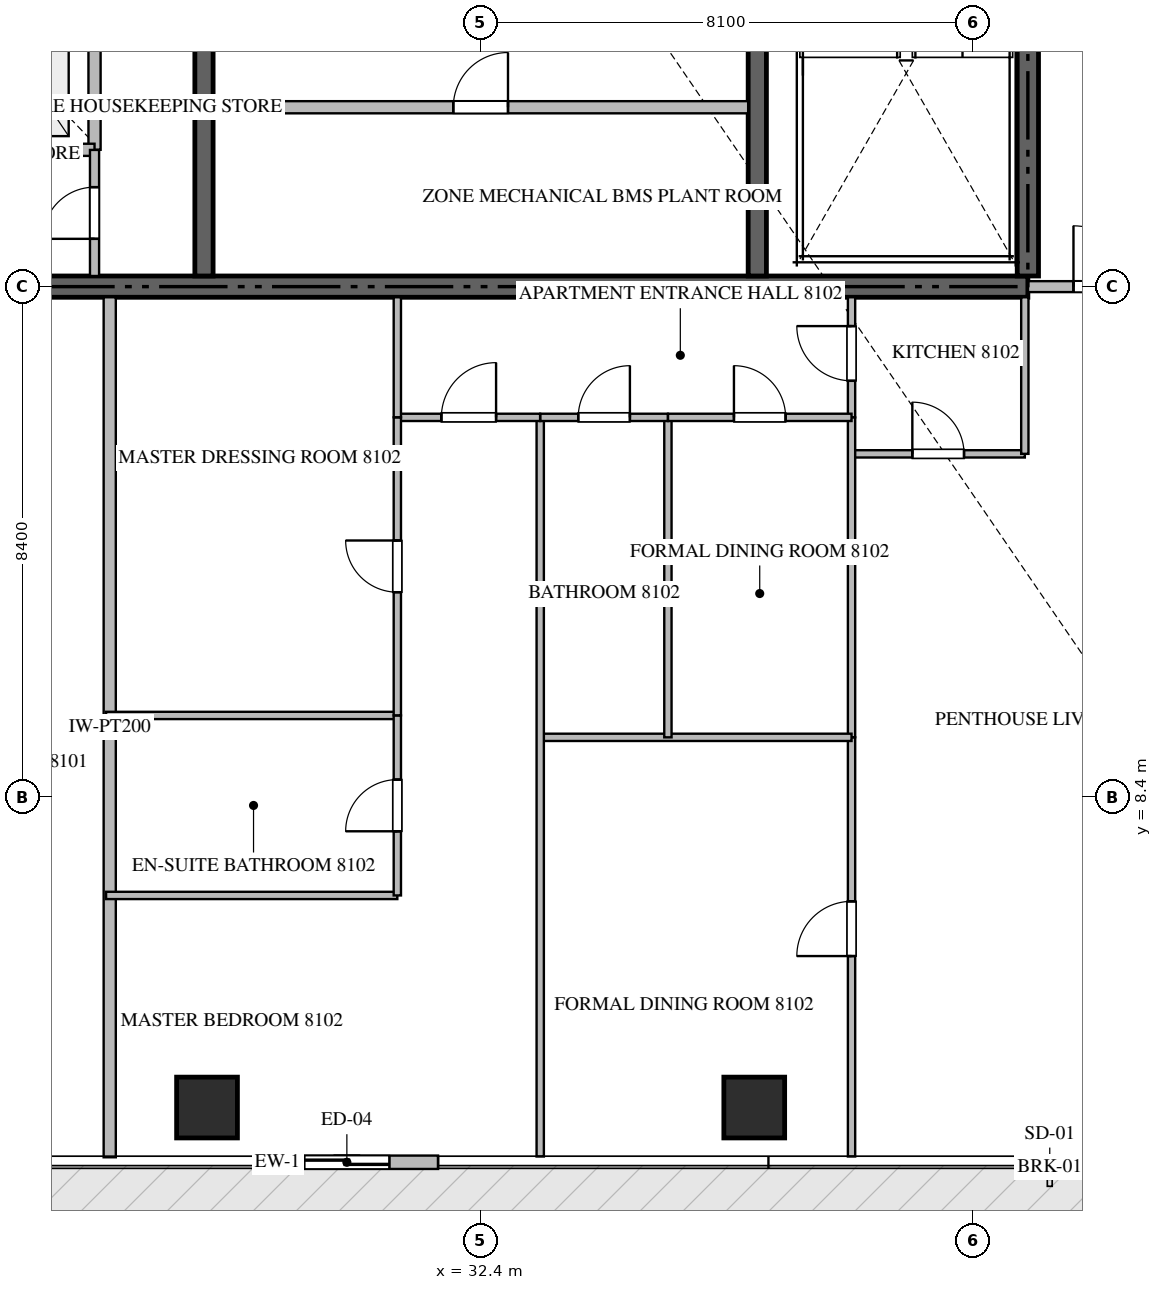
"""IFC4 building model, lengths in metres.
Left out: names, types, materials, properties, quantities, classifications, styles, units other than length and angle.
Written with IfcOpenShell. Run it as: python <this file> out.ifc"""

import sys

from ifc_helpers import new_model, si_unit, direction, frame, frame_2d, origin, origin_2d, place, context, subcontext, project, spatial, rectangle, extrude, source, transform, mapped, element, fill, save


model = new_model("IFC4")
c1 = context("Model", 3, precision=1e-05, world=origin(), true_north=direction((0.0, 1.0)))
c2 = subcontext(c1, "Body", "Model", "MODEL_VIEW")
j1 = project(units=[si_unit("LENGTHUNIT", "METRE"), si_unit("PLANEANGLEUNIT", "RADIAN")], contexts=[c1])
p1 = place(None, origin())
s1 = spatial("IfcSite", under=j1, at=p1, CompositionType="ELEMENT")
p2 = place(p1, origin())
s2 = spatial("IfcBuilding", under=s1, at=p2, CompositionType="ELEMENT")
p3 = place(p2, frame((0.0, 0.0, 325.85)))
s3 = spatial("IfcBuildingStorey", under=s2, at=p3, CompositionType="ELEMENT", Elevation=325.85)
p4 = place(p3, frame((23.4, 16.8, -0.26), z_axis=(0.0, 0.0, 1.0), x_axis=(1.0, 0.0, 0.0)))
e1 = element("IfcWall", 1, at=p4, inside=s3, PredefinedType="SHEAR", context=c2, shape_type="SweptSolid", body=[
    extrude(rectangle(XDim=18.0, YDim=0.35, at=frame_2d((9.0, 0.0))), origin(), (0.0, 0.0, 1.0), 4.048),
])
p5 = place(p3, frame((41.4, 16.975, -0.26), z_axis=(0.0, 0.0, 1.0), x_axis=(0.0, 1.0, 0.0)))
e2 = element("IfcWall", 2, at=p5, inside=s3, PredefinedType="SHEAR", context=c2, shape_type="SweptSolid", body=[
    extrude(rectangle(XDim=8.375, YDim=0.35, at=frame_2d((4.188, 0.0))), origin(), (0.0, 0.0, 1.0), 4.048),
])
p6 = place(p3, frame((27.85, 16.975, -0.26), z_axis=(0.0, 0.0, 1.0), x_axis=(0.0, 1.0, 0.0)))
e3 = element("IfcWall", 3, at=p6, inside=s3, PredefinedType="SHEAR", context=c2, shape_type="SweptSolid", body=[
    extrude(rectangle(XDim=4.875, YDim=0.3, at=frame_2d((2.438, 0.0))), origin(), (0.0, 0.0, 1.0), 4.048),
])
p7 = place(p3, frame((36.95, 16.975, -0.26), z_axis=(0.0, 0.0, 1.0), x_axis=(0.0, 1.0, 0.0)))
e4 = element("IfcWall", 4, at=p7, inside=s3, PredefinedType="SHEAR", context=c2, shape_type="SweptSolid", body=[
    extrude(rectangle(XDim=8.375, YDim=0.3, at=frame_2d((4.188, 0.0))), origin(), (0.0, 0.0, 1.0), 4.048),
])
m1 = source(origin(), c2, "Body", "SweptSolid", [
    extrude(rectangle(XDim=1.0, YDim=1.0, at=origin_2d()), origin(), (0.0, 0.0, 1.0), 4.05),
])
for number, where, z_axis, x_axis in (
    (5, (27.9, 3.3, -0.26), (0.0, 0.0, 1.0), (1.0, 0.0, 0.0)),
    (6, (36.9, 3.3, -0.26), (0.0, 0.0, 1.0), (1.0, 0.0, 0.0)),
):
    element("IfcColumn", number, at=place(p3, frame(where, z_axis=z_axis, x_axis=x_axis)), inside=s3, PredefinedType="COLUMN", context=c2, shape_type="MappedRepresentation", body=[
        mapped(m1, transform((0.0, 0.0, 0.0), scale=1.0)),
    ])
p8 = place(p3, frame((28.7, 2.4, 0.0), z_axis=(0.0, 0.0, 1.0), x_axis=(1.0, 0.0, 0.0)))
e7 = element("IfcWall", 7, at=p8, inside=s3, PredefinedType="ELEMENTEDWALL", context=c2, shape_type="SweptSolid", body=[
    extrude(rectangle(XDim=3.0, YDim=0.22, at=frame_2d((1.5, 0.0))), origin(), (0.0, 0.0, 1.0), 3.775),
])
p9 = place(p8, frame((0.8, 0.0, 0.0)))
e8 = element("IfcOpeningElement", 8, at=p9, cuts=e7, PredefinedType="OPENING", context=c2, shape_type="SweptSolid", body=[
    extrude(rectangle(XDim=1.4, YDim=2.25, at=frame_2d((0.7, 1.125))), frame((0.0, 0.12, 0.0), z_axis=(0.0, -1.0, 0.0), x_axis=(1.0, 0.0, 0.0)), (0.0, 0.0, 1.0), 0.24),
])
p10 = place(p3, frame((26.05, 19.05, 0.0), z_axis=(0.0, 0.0, 1.0), x_axis=(0.0, 1.0, 0.0)))
e9 = element("IfcWall", 9, at=p10, inside=s3, PredefinedType="STANDARD", context=c2, shape_type="SweptSolid", body=[
    extrude(rectangle(XDim=2.5, YDim=0.2, at=frame_2d((1.25, 0.0))), origin(), (0.0, 0.0, 1.0), 3.79),
])
p11 = place(p3, frame((23.575, 19.05, 0.0), z_axis=(0.0, 0.0, 1.0), x_axis=(1.0, 0.0, 0.0)))
e10 = element("IfcWall", 10, at=p11, inside=s3, PredefinedType="STANDARD", context=c2, shape_type="SweptSolid", body=[
    extrude(rectangle(XDim=2.475, YDim=0.2, at=frame_2d((1.238, 0.0))), origin(), (0.0, 0.0, 1.0), 3.79),
])
p12 = place(p3, frame((26.05, 16.975, 0.0), z_axis=(0.0, 0.0, 1.0), x_axis=(0.0, 1.0, 0.0)))
e11 = element("IfcWall", 11, at=p12, inside=s3, PredefinedType="PARTITIONING", context=c2, shape_type="SweptSolid", body=[
    extrude(rectangle(XDim=2.073, YDim=0.15, at=frame_2d((1.037, 0.0))), origin(), (0.0, 0.0, 1.0), 3.79),
])
p13 = place(p12, frame((0.611, 0.0, 0.0)))
e12 = element("IfcOpeningElement", 12, at=p13, cuts=e11, PredefinedType="OPENING", context=c2, shape_type="SweptSolid", body=[
    extrude(rectangle(XDim=0.85, YDim=2.1, at=frame_2d((0.425, 1.05))), frame((0.0, 0.085, 0.0), z_axis=(0.0, -1.0, 0.0), x_axis=(1.0, 0.0, 0.0)), (0.0, 0.0, 1.0), 0.17),
])
p14 = place(p3, frame((28.0, 19.75, 0.0), z_axis=(0.0, 0.0, 1.0), x_axis=(1.0, 0.0, 0.0)))
e13 = element("IfcWall", 13, at=p14, inside=s3, PredefinedType="STANDARD", context=c2, shape_type="SweptSolid", body=[
    extrude(rectangle(XDim=8.8, YDim=0.2, at=frame_2d((4.4, 0.0))), origin(), (0.0, 0.0, 1.0), 3.79),
])
p15 = place(p14, frame((3.95, 0.0, 0.0)))
e14 = element("IfcOpeningElement", 14, at=p15, cuts=e13, PredefinedType="OPENING", context=c2, shape_type="SweptSolid", body=[
    extrude(rectangle(XDim=0.9, YDim=2.1, at=frame_2d((0.45, 1.05))), frame((0.0, 0.11, 0.0), z_axis=(0.0, -1.0, 0.0), x_axis=(1.0, 0.0, 0.0)), (0.0, 0.0, 1.0), 0.22),
])
p16 = place(p3, frame((26.3, 2.482, 0.0), z_axis=(0.0, 0.0, 1.0), x_axis=(0.0, 1.0, 0.0)))
e15 = element("IfcWall", 15, at=p16, inside=s3, PredefinedType="PARTITIONING", context=c2, shape_type="SweptSolid", body=[
    extrude(rectangle(XDim=14.143, YDim=0.2, at=frame_2d((7.072, 0.0))), origin(), (0.0, 0.0, 1.0), 3.79),
])
p17 = place(p3, frame((41.402, 16.8, 0.0), z_axis=(0.0, 0.0, 1.0), x_axis=(1.0, 0.0, 0.0)))
e16 = element("IfcWall", 16, at=p17, inside=s3, PredefinedType="PARTITIONING", context=c2, shape_type="SweptSolid", body=[
    extrude(rectangle(XDim=2.496, YDim=0.18, at=frame_2d((1.248, 0.0))), origin(), (0.0, 0.0, 1.0), 3.79),
])
p18 = place(p17, frame((0.748, 0.0, 0.0)))
e17 = element("IfcOpeningElement", 17, at=p18, cuts=e16, PredefinedType="OPENING", context=c2, shape_type="SweptSolid", body=[
    extrude(rectangle(XDim=1.0, YDim=2.15, at=frame_2d((0.5, 1.075))), frame((0.0, 0.1, 0.0), z_axis=(0.0, -1.0, 0.0), x_axis=(1.0, 0.0, 0.0)), (0.0, 0.0, 1.0), 0.2),
])
p19 = place(p3, frame((38.5, 14.05, 0.0), z_axis=(0.0, 0.0, 1.0), x_axis=(1.0, 0.0, 0.0)))
e18 = element("IfcWall", 18, at=p19, inside=s3, PredefinedType="PARTITIONING", context=c2, shape_type="SweptSolid", body=[
    extrude(rectangle(XDim=2.85, YDim=0.12, at=frame_2d((1.425, 0.0))), origin(), (0.0, 0.0, 1.0), 3.79),
])
p20 = place(p19, frame((1.0, 0.0, 0.0)))
e19 = element("IfcOpeningElement", 19, at=p20, cuts=e18, PredefinedType="OPENING", context=c2, shape_type="SweptSolid", body=[
    extrude(rectangle(XDim=0.85, YDim=2.1, at=frame_2d((0.425, 1.05))), frame((0.0, 0.07, 0.0), z_axis=(0.0, -1.0, 0.0), x_axis=(1.0, 0.0, 0.0)), (0.0, 0.0, 1.0), 0.14),
])
p21 = place(p3, frame((41.35, 14.05, 0.0), z_axis=(0.0, 0.0, 1.0), x_axis=(0.0, 1.0, 0.0)))
e20 = element("IfcWall", 20, at=p21, inside=s3, PredefinedType="PARTITIONING", context=c2, shape_type="SweptSolid", body=[
    extrude(rectangle(XDim=2.575, YDim=0.12, at=frame_2d((1.288, 0.0))), origin(), (0.0, 0.0, 1.0), 3.79),
])
p22 = place(p3, frame((38.5, 14.65, 0.0), z_axis=(0.0, 0.0, 1.0), x_axis=(0.0, 1.0, 0.0)))
e21 = element("IfcWall", 21, at=p22, inside=s3, PredefinedType="PARTITIONING", context=c2, shape_type="SweptSolid", body=[
    extrude(rectangle(XDim=1.975, YDim=0.12, at=frame_2d((0.988, 0.0))), origin(), (0.0, 0.0, 1.0), 3.79),
])
p23 = place(p22, frame((0.601, 0.0, 0.0)))
e22 = element("IfcOpeningElement", 22, at=p23, cuts=e21, PredefinedType="OPENING", context=c2, shape_type="SweptSolid", body=[
    extrude(rectangle(XDim=0.9, YDim=2.1, at=frame_2d((0.45, 1.05))), frame((0.0, 0.07, 0.0), z_axis=(0.0, -1.0, 0.0), x_axis=(1.0, 0.0, 0.0)), (0.0, 0.0, 1.0), 0.14),
])
p24 = place(p3, frame((38.5, 2.495, 0.0), z_axis=(0.0, 0.0, 1.0), x_axis=(0.0, 1.0, 0.0)))
e23 = element("IfcWall", 23, at=p24, inside=s3, PredefinedType="PARTITIONING", context=c2, shape_type="SweptSolid", body=[
    extrude(rectangle(XDim=6.893, YDim=0.12, at=frame_2d((3.446, 0.0))), origin(), (0.0, 0.0, 1.0), 3.79),
])
p25 = place(p24, frame((3.296, 0.0, 0.0)))
e24 = element("IfcOpeningElement", 24, at=p25, cuts=e23, PredefinedType="OPENING", context=c2, shape_type="SweptSolid", body=[
    extrude(rectangle(XDim=0.9, YDim=2.1, at=frame_2d((0.45, 1.05))), frame((0.0, 0.07, 0.0), z_axis=(0.0, -1.0, 0.0), x_axis=(1.0, 0.0, 0.0)), (0.0, 0.0, 1.0), 0.14),
])
p26 = place(p3, frame((38.5, 9.39, 0.0), z_axis=(0.0, 0.0, 1.0), x_axis=(0.0, 1.0, 0.0)))
e25 = element("IfcWall", 25, at=p26, inside=s3, PredefinedType="PARTITIONING", context=c2, shape_type="SweptSolid", body=[
    extrude(rectangle(XDim=5.258, YDim=0.12, at=frame_2d((2.629, 0.0))), origin(), (0.0, 0.0, 1.0), 3.79),
])
p27 = place(p3, frame((33.38, 9.388, 0.0), z_axis=(0.0, 0.0, 1.0), x_axis=(1.0, 0.0, 0.0)))
e26 = element("IfcWall", 26, at=p27, inside=s3, PredefinedType="PARTITIONING", context=c2, shape_type="SweptSolid", body=[
    extrude(rectangle(XDim=5.12, YDim=0.12, at=frame_2d((2.56, 0.0))), origin(), (0.0, 0.0, 1.0), 3.79),
])
p28 = place(p3, frame((33.38, 2.495, 0.0), z_axis=(0.0, 0.0, 1.0), x_axis=(0.0, 1.0, 0.0)))
e27 = element("IfcWall", 27, at=p28, inside=s3, PredefinedType="PARTITIONING", context=c2, shape_type="SweptSolid", body=[
    extrude(rectangle(XDim=12.155, YDim=0.12, at=frame_2d((6.077, 0.0))), origin(), (0.0, 0.0, 1.0), 3.79),
])
p29 = place(p3, frame((35.48, 9.388, 0.0), z_axis=(0.0, 0.0, 1.0), x_axis=(0.0, 1.0, 0.0)))
e28 = element("IfcWall", 28, at=p29, inside=s3, PredefinedType="PARTITIONING", context=c2, shape_type="SweptSolid", body=[
    extrude(rectangle(XDim=5.262, YDim=0.12, at=frame_2d((2.631, 0.0))), origin(), (0.0, 0.0, 1.0), 3.79),
])
p30 = place(p3, frame((33.38, 14.65, 0.0), z_axis=(0.0, 0.0, 1.0), x_axis=(1.0, 0.0, 0.0)))
e29 = element("IfcWall", 29, at=p30, inside=s3, PredefinedType="PARTITIONING", context=c2, shape_type="SweptSolid", body=[
    extrude(rectangle(XDim=2.1, YDim=0.12, at=frame_2d((1.05, 0.0))), origin(), (0.0, 0.0, 1.0), 3.79),
])
p31 = place(p30, frame((0.625, 0.0, 0.0)))
e30 = element("IfcOpeningElement", 30, at=p31, cuts=e29, PredefinedType="OPENING", context=c2, shape_type="SweptSolid", body=[
    extrude(rectangle(XDim=0.85, YDim=2.1, at=frame_2d((0.425, 1.05))), frame((0.0, 0.07, 0.0), z_axis=(0.0, -1.0, 0.0), x_axis=(1.0, 0.0, 0.0)), (0.0, 0.0, 1.0), 0.14),
])
p32 = place(p3, frame((35.482, 14.65, 0.0), z_axis=(0.0, 0.0, 1.0), x_axis=(1.0, 0.0, 0.0)))
e31 = element("IfcWall", 31, at=p32, inside=s3, PredefinedType="PARTITIONING", context=c2, shape_type="SweptSolid", body=[
    extrude(rectangle(XDim=3.018, YDim=0.12, at=frame_2d((1.509, 0.0))), origin(), (0.0, 0.0, 1.0), 3.79),
])
p33 = place(p32, frame((1.084, 0.0, 0.0)))
e32 = element("IfcOpeningElement", 32, at=p33, cuts=e31, PredefinedType="OPENING", context=c2, shape_type="SweptSolid", body=[
    extrude(rectangle(XDim=0.85, YDim=2.1, at=frame_2d((0.425, 1.05))), frame((0.0, 0.07, 0.0), z_axis=(0.0, -1.0, 0.0), x_axis=(1.0, 0.0, 0.0)), (0.0, 0.0, 1.0), 0.14),
])
p34 = place(p3, frame((31.03, 14.65, 0.0), z_axis=(0.0, 0.0, 1.0), x_axis=(1.0, 0.0, 0.0)))
e33 = element("IfcWall", 33, at=p34, inside=s3, PredefinedType="PARTITIONING", context=c2, shape_type="SweptSolid", body=[
    extrude(rectangle(XDim=2.348, YDim=0.12, at=frame_2d((1.174, 0.0))), origin(), (0.0, 0.0, 1.0), 3.79),
])
p35 = place(p34, frame((0.724, 0.0, 0.0)))
e34 = element("IfcOpeningElement", 34, at=p35, cuts=e33, PredefinedType="OPENING", context=c2, shape_type="SweptSolid", body=[
    extrude(rectangle(XDim=0.9, YDim=2.1, at=frame_2d((0.45, 1.05))), frame((0.0, 0.07, 0.0), z_axis=(0.0, -1.0, 0.0), x_axis=(1.0, 0.0, 0.0)), (0.0, 0.0, 1.0), 0.14),
])
for number, where, z_axis, x_axis in (
    (35, (26.24, 6.788, 0.0), (0.0, 0.0, 1.0), (1.0, 0.0, 0.0)),
    (36, (26.24, 9.748, 0.0), (0.0, 0.0, 1.0), (1.0, 0.0, 0.0)),
):
    element("IfcWall", number, at=place(p3, frame(where, z_axis=z_axis, x_axis=x_axis)), inside=s3, PredefinedType="PARTITIONING", context=c2, shape_type="SweptSolid", body=[
        extrude(rectangle(XDim=4.79, YDim=0.12, at=frame_2d((2.395, 0.0))), origin(), (0.0, 0.0, 1.0), 3.79),
    ])
p36 = place(p3, frame((31.03, 6.788, 0.0), z_axis=(0.0, 0.0, 1.0), x_axis=(0.0, 1.0, 0.0)))
e37 = element("IfcWall", 37, at=p36, inside=s3, PredefinedType="PARTITIONING", context=c2, shape_type="SweptSolid", body=[
    extrude(rectangle(XDim=2.96, YDim=0.12, at=frame_2d((1.48, 0.0))), origin(), (0.0, 0.0, 1.0), 3.79),
])
p37 = place(p36, frame((1.055, 0.0, 0.0)))
e38 = element("IfcOpeningElement", 38, at=p37, cuts=e37, PredefinedType="OPENING", context=c2, shape_type="SweptSolid", body=[
    extrude(rectangle(XDim=0.85, YDim=2.1, at=frame_2d((0.425, 1.05))), frame((0.0, 0.07, 0.0), z_axis=(0.0, -1.0, 0.0), x_axis=(1.0, 0.0, 0.0)), (0.0, 0.0, 1.0), 0.14),
])
p38 = place(p3, frame((31.03, 9.75, 0.0), z_axis=(0.0, 0.0, 1.0), x_axis=(0.0, 1.0, 0.0)))
e39 = element("IfcWall", 39, at=p38, inside=s3, PredefinedType="PARTITIONING", context=c2, shape_type="SweptSolid", body=[
    extrude(rectangle(XDim=4.9, YDim=0.12, at=frame_2d((2.45, 0.0))), origin(), (0.0, 0.0, 1.0), 3.79),
])
p39 = place(p38, frame((2.025, 0.0, 0.0)))
e40 = element("IfcOpeningElement", 40, at=p39, cuts=e39, PredefinedType="OPENING", context=c2, shape_type="SweptSolid", body=[
    extrude(rectangle(XDim=0.85, YDim=2.1, at=frame_2d((0.425, 1.05))), frame((0.0, 0.07, 0.0), z_axis=(0.0, -1.0, 0.0), x_axis=(1.0, 0.0, 0.0)), (0.0, 0.0, 1.0), 0.14),
])
p40 = place(p3, frame((31.03, 14.652, 0.0), z_axis=(0.0, 0.0, 1.0), x_axis=(0.0, 1.0, 0.0)))
e41 = element("IfcWall", 41, at=p40, inside=s3, PredefinedType="PARTITIONING", context=c2, shape_type="SweptSolid", body=[
    extrude(rectangle(XDim=1.973, YDim=0.12, at=frame_2d((0.986, 0.0))), origin(), (0.0, 0.0, 1.0), 3.79),
])
m2 = source(origin(), c2, "Body", "SweptSolid", [
    extrude(rectangle(XDim=1.4, YDim=2.25, at=frame_2d((0.7, 1.125))), frame((0.0, 0.025, 0.0), z_axis=(0.0, -1.0, 0.0), x_axis=(1.0, 0.0, 0.0)), (0.0, 0.0, 1.0), 0.05),
])
p41 = place(p9, origin())
e42 = element("IfcDoor", 42, at=p41, inside=s3, OperationType="SLIDING_TO_LEFT", PredefinedType="DOOR", context=c2, shape_type="MappedRepresentation", body=[
    mapped(m2, transform((0.0, 0.0, 0.0), scale=1.0)),
])
fill(e8, e42)
m3 = source(origin(), c2, "Body", "SweptSolid", [
    extrude(rectangle(XDim=0.85, YDim=2.1, at=frame_2d((0.425, 1.05))), frame((0.0, 0.025, 0.0), z_axis=(0.0, -1.0, 0.0), x_axis=(1.0, 0.0, 0.0)), (0.0, 0.0, 1.0), 0.05),
])
p42 = place(p13, origin())
e43 = element("IfcDoor", 43, at=p42, inside=s3, OperationType="SINGLE_SWING_LEFT", PredefinedType="DOOR", context=c2, shape_type="MappedRepresentation", body=[
    mapped(m3, transform((0.0, 0.0, 0.0), scale=1.0)),
])
fill(e12, e43)
m4 = source(origin(), c2, "Body", "SweptSolid", [
    extrude(rectangle(XDim=0.9, YDim=2.1, at=frame_2d((0.45, 1.05))), frame((0.0, 0.025, 0.0), z_axis=(0.0, -1.0, 0.0), x_axis=(1.0, 0.0, 0.0)), (0.0, 0.0, 1.0), 0.05),
])
p43 = place(p15, origin())
e44 = element("IfcDoor", 44, at=p43, inside=s3, OperationType="SINGLE_SWING_RIGHT", PredefinedType="DOOR", context=c2, shape_type="MappedRepresentation", body=[
    mapped(m4, transform((0.0, 0.0, 0.0), scale=1.0)),
])
fill(e14, e44)
m5 = source(origin(), c2, "Body", "SweptSolid", [
    extrude(rectangle(XDim=1.0, YDim=2.15, at=frame_2d((0.5, 1.075))), frame((0.0, 0.025, 0.0), z_axis=(0.0, -1.0, 0.0), x_axis=(1.0, 0.0, 0.0)), (0.0, 0.0, 1.0), 0.05),
])
p44 = place(p18, origin())
e45 = element("IfcDoor", 45, at=p44, inside=s3, OperationType="SINGLE_SWING_LEFT", PredefinedType="DOOR", context=c2, shape_type="MappedRepresentation", body=[
    mapped(m5, transform((0.0, 0.0, 0.0), scale=1.0)),
])
fill(e17, e45)
p45 = place(p20, origin())
e46 = element("IfcDoor", 46, at=p45, inside=s3, OperationType="SINGLE_SWING_LEFT", PredefinedType="DOOR", context=c2, shape_type="MappedRepresentation", body=[
    mapped(m3, transform((0.0, 0.0, 0.0), scale=1.0)),
])
fill(e19, e46)
p46 = place(p23, origin())
e47 = element("IfcDoor", 47, at=p46, inside=s3, OperationType="SINGLE_SWING_RIGHT", PredefinedType="DOOR", context=c2, shape_type="MappedRepresentation", body=[
    mapped(m4, transform((0.0, 0.0, 0.0), scale=1.0)),
])
fill(e22, e47)
p47 = place(p25, origin())
e48 = element("IfcDoor", 48, at=p47, inside=s3, OperationType="SINGLE_SWING_LEFT", PredefinedType="DOOR", context=c2, shape_type="MappedRepresentation", body=[
    mapped(m4, transform((0.0, 0.0, 0.0), scale=1.0)),
])
fill(e24, e48)
p48 = place(p31, origin())
e49 = element("IfcDoor", 49, at=p48, inside=s3, OperationType="SINGLE_SWING_RIGHT", PredefinedType="DOOR", context=c2, shape_type="MappedRepresentation", body=[
    mapped(m3, transform((0.0, 0.0, 0.0), scale=1.0)),
])
fill(e30, e49)
p49 = place(p33, origin())
e50 = element("IfcDoor", 50, at=p49, inside=s3, OperationType="SINGLE_SWING_LEFT", PredefinedType="DOOR", context=c2, shape_type="MappedRepresentation", body=[
    mapped(m3, transform((0.0, 0.0, 0.0), scale=1.0)),
])
fill(e32, e50)
p50 = place(p35, origin())
e51 = element("IfcDoor", 51, at=p50, inside=s3, OperationType="SINGLE_SWING_RIGHT", PredefinedType="DOOR", context=c2, shape_type="MappedRepresentation", body=[
    mapped(m4, transform((0.0, 0.0, 0.0), scale=1.0)),
])
fill(e34, e51)
p51 = place(p37, origin())
e52 = element("IfcDoor", 52, at=p51, inside=s3, OperationType="SINGLE_SWING_LEFT", PredefinedType="DOOR", context=c2, shape_type="MappedRepresentation", body=[
    mapped(m3, transform((0.0, 0.0, 0.0), scale=1.0)),
])
fill(e38, e52)
p52 = place(p39, origin())
e53 = element("IfcDoor", 53, at=p52, inside=s3, OperationType="SINGLE_SWING_RIGHT", PredefinedType="DOOR", context=c2, shape_type="MappedRepresentation", body=[
    mapped(m3, transform((0.0, 0.0, 0.0), scale=1.0)),
])
fill(e40, e53)
save(model, sys.argv[1])
